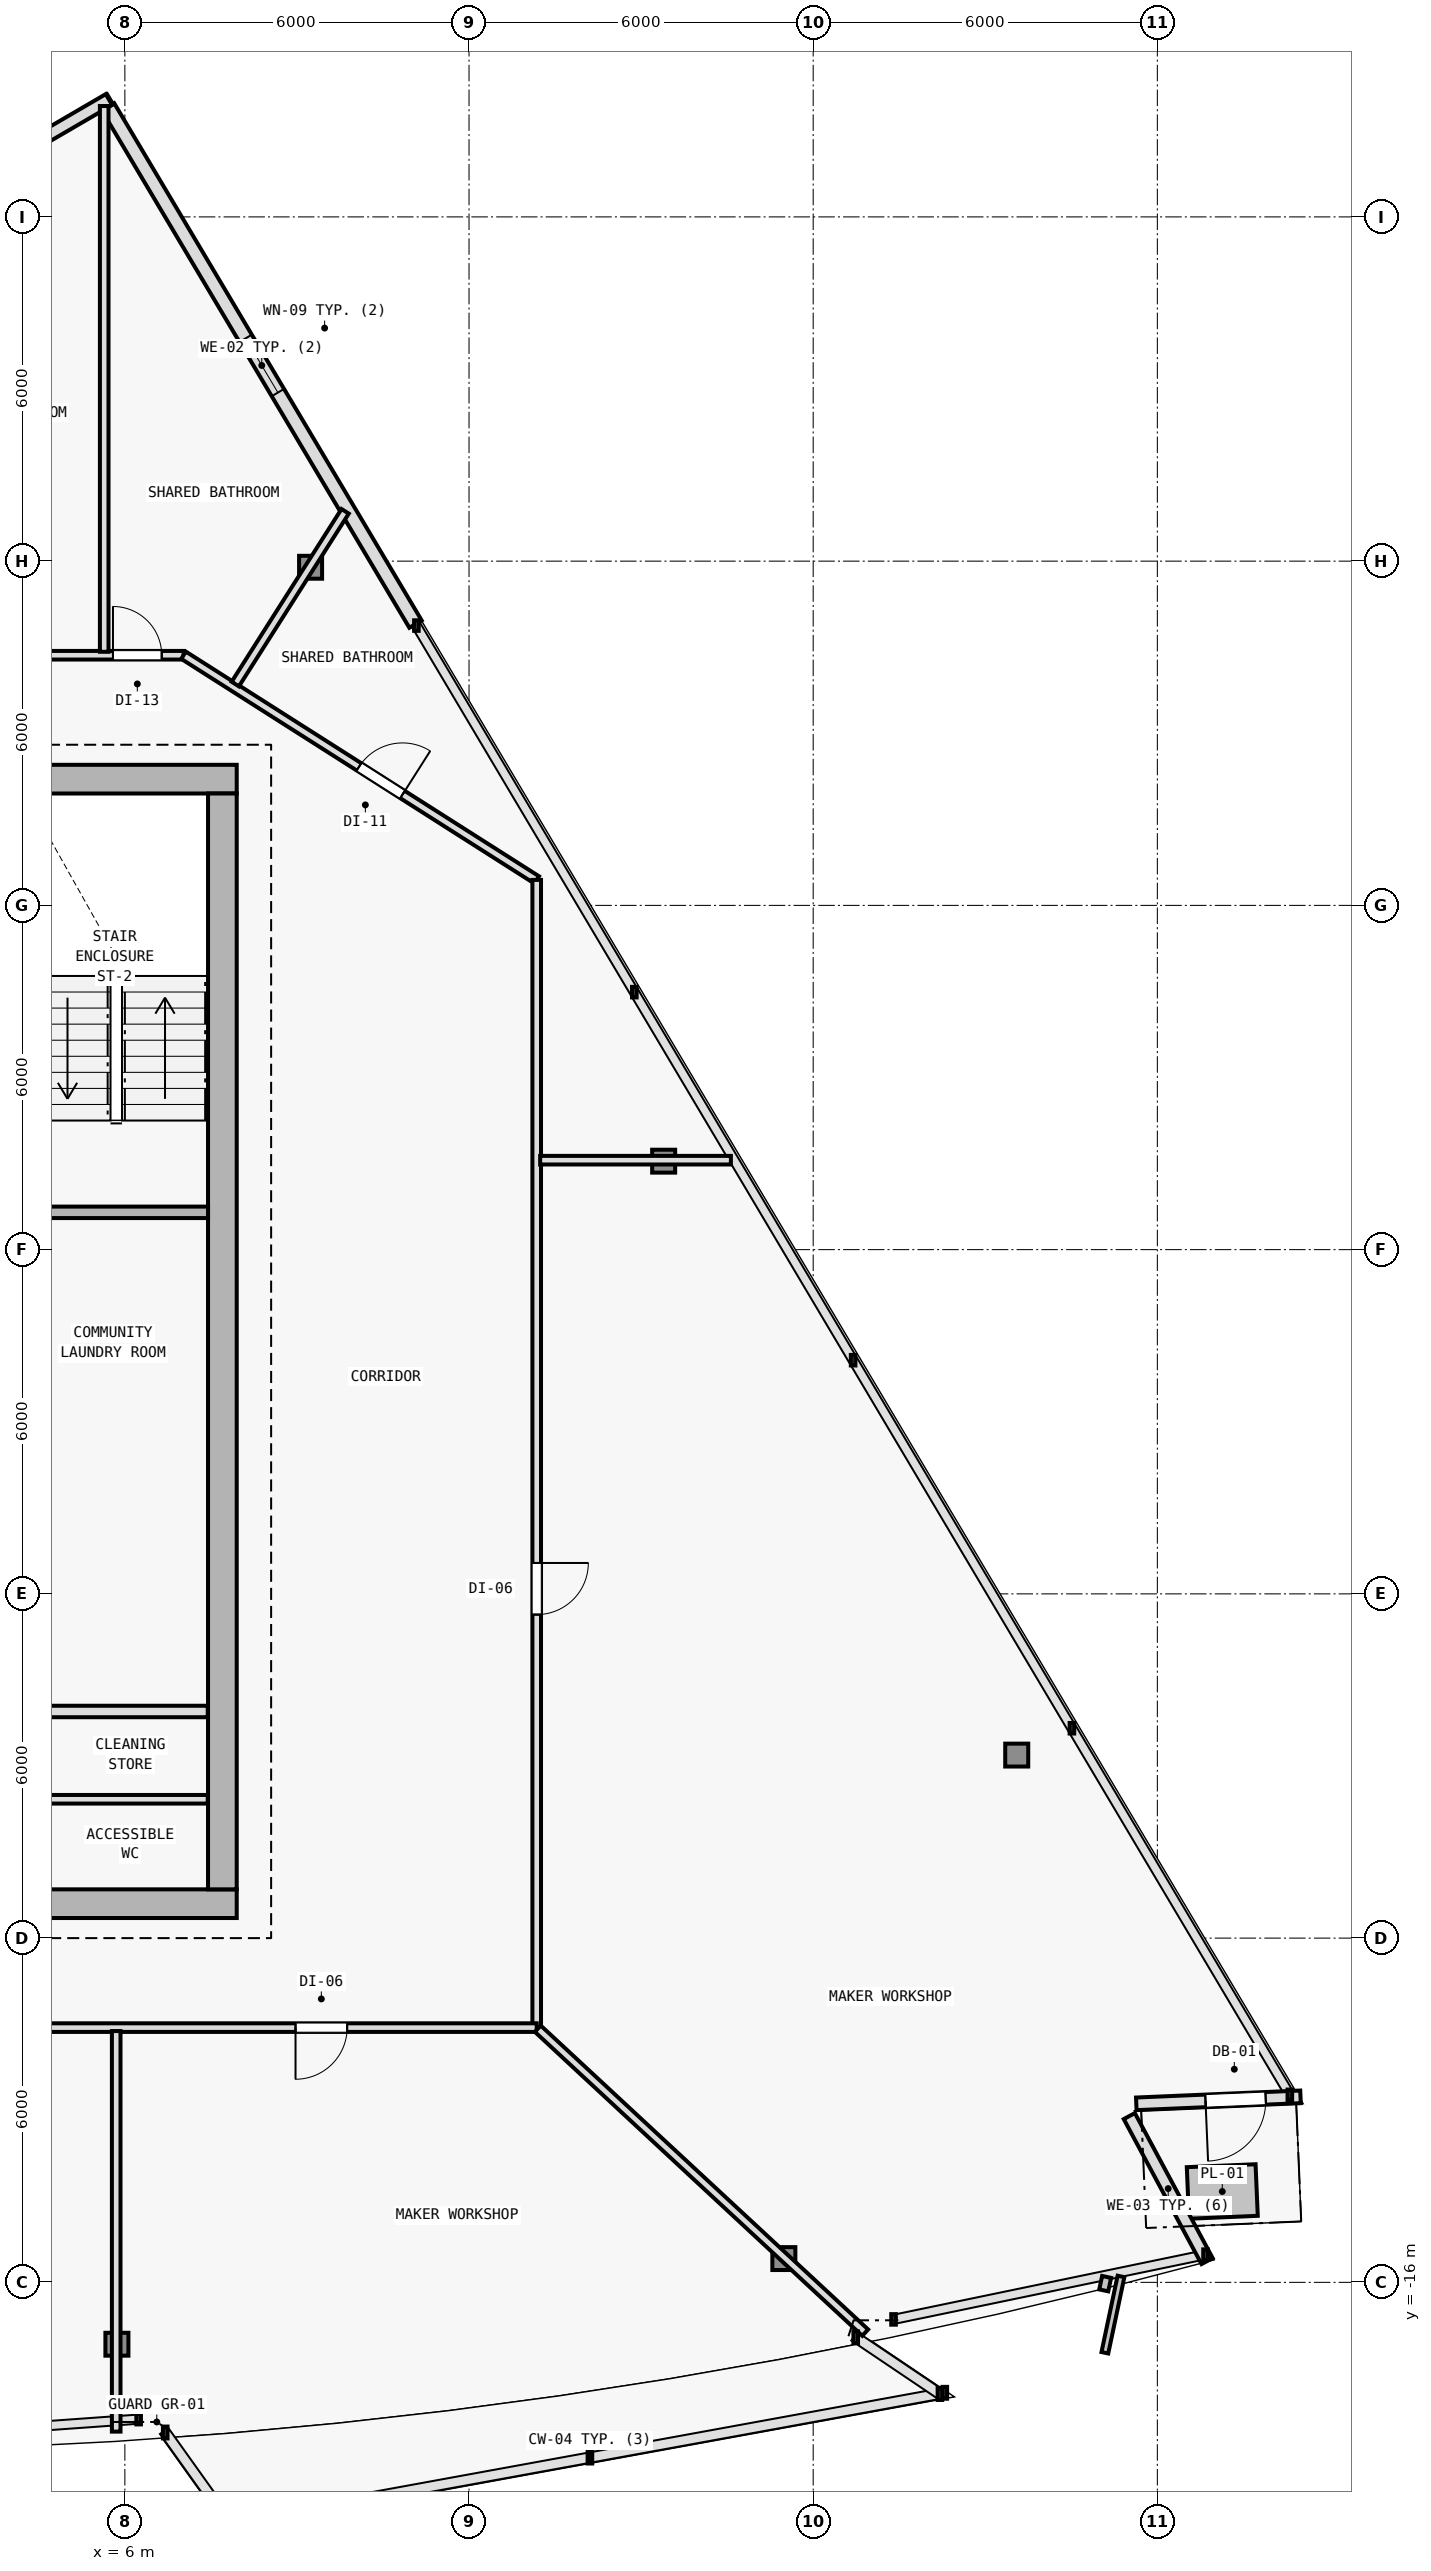
"""IFC4 building model, lengths in metres.
Left out: names, types, materials, properties, quantities, classifications, styles, units other than length and angle.
Written with IfcOpenShell. Run it as: python <this file> out.ifc"""

import sys

from ifc_helpers import new_model, si_unit, direction, frame, frame_2d, origin, origin_2d, place, context, subcontext, project, spatial, rectangle, i_section, extrude, element, fill, save


model = new_model("IFC4")
c1 = context("Model", 3, precision=1e-05, world=origin(), true_north=direction((0.0, 1.0)))
c2 = subcontext(c1, "Body", "Model", "MODEL_VIEW")
j1 = project(units=[si_unit("LENGTHUNIT", "METRE"), si_unit("PLANEANGLEUNIT", "RADIAN")], contexts=[c1])
p1 = place(None, origin())
s1 = spatial("IfcSite", under=j1, at=p1, CompositionType="ELEMENT")
p2 = place(p1, origin())
s2 = spatial("IfcBuilding", under=s1, at=p2, CompositionType="ELEMENT")
p3 = place(p2, frame((0.0, 0.0, 171.0)))
s3 = spatial("IfcBuildingStorey", under=s2, at=p3, CompositionType="ELEMENT", Elevation=171.0)
for number, where, z_axis, x_axis in (
    (1, (7.7, -9.4, 0.0), (0.0, 0.0, 1.0), (1.0, 0.0, 0.0)),
    (2, (7.7, 10.2, 0.0), (0.0, 0.0, 1.0), (1.0, 0.0, 0.0)),
    (3, (7.7, 0.4, 0.0), (0.0, 0.0, 1.0), (1.0, 0.0, 0.0)),
):
    element("IfcColumn", number, at=place(p3, frame(where, z_axis=z_axis, x_axis=x_axis)), inside=s3, PredefinedType="COLUMN", context=c2, shape_type="SweptSolid", body=[
        extrude(i_section(OverallWidth=0.404, OverallDepth=0.407, WebThickness=0.017, FlangeThickness=0.028, FilletRadius=0.015, at=origin_2d()), origin(), (0.0, 0.0, 1.0), 3.6),
    ])
p4 = place(p3, frame((5.861, -17.079, 0.006), z_axis=(-0.006934288159, 0.035283289748, 0.999353293441), x_axis=(-0.981229659911, -0.192842823335, 0.0)))
e4 = element("IfcColumn", 4, at=p4, inside=s3, PredefinedType="COLUMN", context=c2, shape_type="SweptSolid", body=[
    extrude(i_section(OverallWidth=0.401, OverallDepth=0.399, WebThickness=0.016, FlangeThickness=0.025, FilletRadius=0.015, at=origin_2d()), origin(), (0.0, 0.0, 1.0), 3.591),
])
p5 = place(p3, frame((17.489, -15.586, 0.006), z_axis=(-0.020596292833, 0.033511459955, 0.999226087917), x_axis=(-0.851954850327, -0.523615252838, 0.0)))
e5 = element("IfcColumn", 5, at=p5, inside=s3, PredefinedType="COLUMN", context=c2, shape_type="SweptSolid", body=[
    extrude(i_section(OverallWidth=0.401, OverallDepth=0.399, WebThickness=0.016, FlangeThickness=0.025, FilletRadius=0.015, at=origin_2d()), origin(), (0.0, 0.0, 1.0), 3.592),
])
p6 = place(p3, frame((21.548, -6.81, 0.006), z_axis=(-0.026107475214, 0.021552264695, 0.999426785525), x_axis=(-0.636621915226, -0.771176073964, 0.0)))
e6 = element("IfcColumn", 6, at=p6, inside=s3, PredefinedType="COLUMN", context=c2, shape_type="SweptSolid", body=[
    extrude(i_section(OverallWidth=0.401, OverallDepth=0.399, WebThickness=0.016, FlangeThickness=0.025, FilletRadius=0.015, at=origin_2d()), origin(), (0.0, 0.0, 1.0), 3.591),
])
p7 = place(p3, frame((15.393, 3.542, 0.006), z_axis=(-0.018907326549, 0.00952167524, 0.999775900241), x_axis=(-0.449781931574, -0.893138406984, 0.0)))
e7 = element("IfcColumn", 7, at=p7, inside=s3, PredefinedType="COLUMN", context=c2, shape_type="SweptSolid", body=[
    extrude(i_section(OverallWidth=0.401, OverallDepth=0.399, WebThickness=0.016, FlangeThickness=0.025, FilletRadius=0.015, at=origin_2d()), origin(), (0.0, 0.0, 1.0), 3.59),
])
p8 = place(p3, frame((9.238, 13.893, 0.006), z_axis=(-0.011699842352, -0.002516826552, 0.999928387072), x_axis=(0.210305364179, -0.977635746993, 0.0)))
e8 = element("IfcColumn", 8, at=p8, inside=s3, PredefinedType="COLUMN", context=c2, shape_type="SweptSolid", body=[
    extrude(i_section(OverallWidth=0.401, OverallDepth=0.399, WebThickness=0.016, FlangeThickness=0.025, FilletRadius=0.015, at=origin_2d()), origin(), (0.0, 0.0, 1.0), 3.589),
])
p9 = place(p3, frame((5.706, 21.919, 0.0), z_axis=(0.0, 0.0, 1.0), x_axis=(0.511079110892, -0.859533677298, 0.0)))
e9 = element("IfcWall", 9, at=p9, inside=s3, PredefinedType="SOLIDWALL", context=c2, shape_type="SweptSolid", body=[
    extrude(rectangle(XDim=10.489, YDim=0.25, at=frame_2d((5.245, 0.0))), origin(), (0.0, 0.0, 1.0), 3.35),
])
p10 = place(p9, frame((4.695, 0.0, 0.62)))
e10 = element("IfcOpeningElement", 10, at=p10, cuts=e9, PredefinedType="OPENING", context=c2, shape_type="SweptSolid", body=[
    extrude(rectangle(XDim=1.1, YDim=1.8, at=frame_2d((0.55, 0.9))), frame((0.0, 0.135, 0.0), z_axis=(0.0, -1.0, 0.0), x_axis=(1.0, 0.0, 0.0)), (0.0, 0.0, 1.0), 0.27),
])
p11 = place(p3, frame((23.511, -13.102, 0.0), z_axis=(0.0, 0.0, 1.0), x_axis=(0.472804807667, -0.881167188362, 0.0)))
e11 = element("IfcWall", 11, at=p11, inside=s3, PredefinedType="SOLIDWALL", context=c2, shape_type="SweptSolid", body=[
    extrude(rectangle(XDim=2.868, YDim=0.22, at=frame_2d((1.434, 0.0))), origin(), (0.0, 0.0, 1.0), 3.35),
])
p12 = place(p3, frame((26.496, -12.767, 0.0), z_axis=(0.0, 0.0, 1.0), x_axis=(-0.999095763679, -0.042516526188, 0.0)))
e12 = element("IfcWall", 12, at=p12, inside=s3, PredefinedType="SOLIDWALL", context=c2, shape_type="SweptSolid", body=[
    extrude(rectangle(XDim=2.865, YDim=0.22, at=frame_2d((1.433, 0.0))), origin(), (0.0, 0.0, 1.0), 3.35),
])
p13 = place(p12, frame((0.608, 0.0, 0.0)))
e13 = element("IfcOpeningElement", 13, at=p13, cuts=e12, PredefinedType="OPENING", context=c2, shape_type="SweptSolid", body=[
    extrude(rectangle(XDim=1.05, YDim=2.15, at=frame_2d((0.525, 1.075))), frame((0.0, 0.12, 0.0), z_axis=(0.0, -1.0, 0.0), x_axis=(1.0, 0.0, 0.0)), (0.0, 0.0, 1.0), 0.24),
])
p14 = place(p3, frame((1.987, 19.868, 0.0), z_axis=(0.0, 0.0, 1.0), x_axis=(0.863979520686, 0.503526948469, 0.0)))
e14 = element("IfcWall", 14, at=p14, inside=s3, PredefinedType="SOLIDWALL", context=c2, shape_type="SweptSolid", body=[
    extrude(rectangle(XDim=4.324, YDim=0.22, at=frame_2d((2.162, 0.0))), origin(), (0.0, 0.0, 1.0), 3.35),
])
p15 = place(p3, frame((-7.95, -9.4, 0.0), z_axis=(0.0, 0.0, 1.0), x_axis=(1.0, 0.0, 0.0)))
e15 = element("IfcWall", 15, at=p15, inside=s3, PredefinedType="SHEAR", context=c2, shape_type="SweptSolid", body=[
    extrude(rectangle(XDim=15.9, YDim=0.5, at=frame_2d((7.95, 0.0))), origin(), (0.0, 0.0, 1.0), 3.35),
])
p16 = place(p15, frame((9.6, 0.0, 0.0)))
e16 = element("IfcOpeningElement", 16, at=p16, cuts=e15, PredefinedType="OPENING", context=c2, shape_type="SweptSolid", body=[
    extrude(rectangle(XDim=1.5, YDim=2.2, at=frame_2d((0.75, 1.1))), frame((0.0, 0.26, 0.0), z_axis=(0.0, -1.0, 0.0), x_axis=(1.0, 0.0, 0.0)), (0.0, 0.0, 1.0), 0.52),
])
p17 = place(p3, frame((7.95, 10.2, 0.0), z_axis=(0.0, 0.0, 1.0), x_axis=(-1.0, 0.0, 0.0)))
e17 = element("IfcWall", 17, at=p17, inside=s3, PredefinedType="SHEAR", context=c2, shape_type="SweptSolid", body=[
    extrude(rectangle(XDim=15.9, YDim=0.5, at=frame_2d((7.95, 0.0))), origin(), (0.0, 0.0, 1.0), 3.35),
])
p18 = place(p17, frame((4.4, 0.0, 0.0)))
e18 = element("IfcOpeningElement", 18, at=p18, cuts=e17, PredefinedType="OPENING", context=c2, shape_type="SweptSolid", body=[
    extrude(rectangle(XDim=1.1, YDim=2.15, at=frame_2d((0.55, 1.075))), frame((0.0, 0.26, 0.0), z_axis=(0.0, -1.0, 0.0), x_axis=(1.0, 0.0, 0.0)), (0.0, 0.0, 1.0), 0.52),
])
p19 = place(p3, frame((7.7, 9.95, 0.0), z_axis=(0.0, 0.0, 1.0), x_axis=(0.0, -1.0, 0.0)))
e19 = element("IfcWall", 19, at=p19, inside=s3, PredefinedType="SHEAR", context=c2, shape_type="SweptSolid", body=[
    extrude(rectangle(XDim=19.1, YDim=0.5, at=frame_2d((9.55, 0.0))), origin(), (0.0, 0.0, 1.0), 3.35),
])
p20 = place(p3, frame((4.05, 2.65, 0.0), z_axis=(0.0, 0.0, 1.0), x_axis=(1.0, 0.0, 0.0)))
e20 = element("IfcWall", 20, at=p20, inside=s3, PredefinedType="SOLIDWALL", context=c2, shape_type="SweptSolid", body=[
    extrude(rectangle(XDim=3.4, YDim=0.2, at=frame_2d((1.7, 0.0))), origin(), (0.0, 0.0, 1.0), 3.35),
])
p21 = place(p3, frame((4.15, -6.05, 0.0), z_axis=(0.0, 0.0, 1.0), x_axis=(1.0, 0.0, 0.0)))
e21 = element("IfcWall", 21, at=p21, inside=s3, PredefinedType="SOLIDWALL", context=c2, shape_type="SweptSolid", body=[
    extrude(rectangle(XDim=3.295, YDim=0.2, at=frame_2d((1.647, 0.0))), origin(), (0.0, 0.0, 1.0), 3.35),
])
p22 = place(p3, frame((4.15, -7.58, 0.0), z_axis=(0.0, 0.0, 1.0), x_axis=(1.0, 0.0, 0.0)))
e22 = element("IfcWall", 22, at=p22, inside=s3, PredefinedType="PARTITIONING", context=c2, shape_type="SweptSolid", body=[
    extrude(rectangle(XDim=3.295, YDim=0.15, at=frame_2d((1.647, 0.0))), origin(), (0.0, 0.0, 1.0), 3.35),
])
p23 = place(p3, frame((-7.041, 12.36, 0.0), z_axis=(0.0, 0.0, 1.0), x_axis=(1.0, 0.0, 0.0)))
e23 = element("IfcWall", 23, at=p23, inside=s3, PredefinedType="PARTITIONING", context=c2, shape_type="SweptSolid", body=[
    extrude(rectangle(XDim=14.064, YDim=0.15, at=frame_2d((7.032, 0.0))), origin(), (0.0, 0.0, 1.0), 2.965),
])
p24 = place(p23, frame((12.833, 0.0, 0.0)))
e24 = element("IfcOpeningElement", 24, at=p24, cuts=e23, PredefinedType="OPENING", context=c2, shape_type="SweptSolid", body=[
    extrude(rectangle(XDim=0.85, YDim=2.1, at=frame_2d((0.425, 1.05))), frame((0.0, 0.085, 0.0), z_axis=(0.0, -1.0, 0.0), x_axis=(1.0, 0.0, 0.0)), (0.0, 0.0, 1.0), 0.17),
])
p25 = place(p23, frame((10.357, 0.0, 0.0)))
e25 = element("IfcOpeningElement", 25, at=p25, cuts=e23, PredefinedType="OPENING", context=c2, shape_type="SweptSolid", body=[
    extrude(rectangle(XDim=0.9, YDim=2.1, at=frame_2d((0.45, 1.05))), frame((0.0, 0.085, 0.0), z_axis=(0.0, -1.0, 0.0), x_axis=(1.0, 0.0, 0.0)), (0.0, 0.0, 1.0), 0.17),
])
p26 = place(p23, frame((4.167, 0.0, 0.0)))
e26 = element("IfcOpeningElement", 26, at=p26, cuts=e23, PredefinedType="OPENING", context=c2, shape_type="SweptSolid", body=[
    extrude(rectangle(XDim=0.9, YDim=2.1, at=frame_2d((0.45, 1.05))), frame((0.0, 0.085, 0.0), z_axis=(0.0, -1.0, 0.0), x_axis=(1.0, 0.0, 0.0)), (0.0, 0.0, 1.0), 0.17),
])
p27 = place(p3, frame((7.023, 12.36, 0.0), z_axis=(0.0, 0.0, 1.0), x_axis=(0.84376480085, -0.536713108511, 0.0)))
e27 = element("IfcWall", 27, at=p27, inside=s3, PredefinedType="PARTITIONING", context=c2, shape_type="SweptSolid", body=[
    extrude(rectangle(XDim=7.297, YDim=0.15, at=frame_2d((3.648, 0.0))), origin(), (0.0, 0.0, 1.0), 2.935),
])
p28 = place(p27, frame((3.624, 0.0, 0.0)))
e28 = element("IfcOpeningElement", 28, at=p28, cuts=e27, PredefinedType="OPENING", context=c2, shape_type="SweptSolid", body=[
    extrude(rectangle(XDim=0.9, YDim=2.1, at=frame_2d((0.45, 1.05))), frame((0.0, 0.085, 0.0), z_axis=(0.0, -1.0, 0.0), x_axis=(1.0, 0.0, 0.0)), (0.0, 0.0, 1.0), 0.17),
])
p29 = place(p3, frame((13.18, 8.444, 0.0), z_axis=(0.0, 0.0, 1.0), x_axis=(0.0, -1.0, 0.0)))
e29 = element("IfcWall", 29, at=p29, inside=s3, PredefinedType="PARTITIONING", context=c2, shape_type="SweptSolid", body=[
    extrude(rectangle(XDim=20.004, YDim=0.15, at=frame_2d((10.002, 0.0))), origin(), (0.0, 0.0, 1.0), 2.825),
])
p30 = place(p29, frame((11.905, 0.0, 0.0)))
e30 = element("IfcOpeningElement", 30, at=p30, cuts=e29, PredefinedType="OPENING", context=c2, shape_type="SweptSolid", body=[
    extrude(rectangle(XDim=0.9, YDim=2.1, at=frame_2d((0.45, 1.05))), frame((0.0, 0.085, 0.0), z_axis=(0.0, -1.0, 0.0), x_axis=(1.0, 0.0, 0.0)), (0.0, 0.0, 1.0), 0.17),
])
p31 = place(p3, frame((13.18, -11.56, 0.0), z_axis=(0.0, 0.0, 1.0), x_axis=(-1.0, 0.0, 0.0)))
e31 = element("IfcWall", 31, at=p31, inside=s3, PredefinedType="PARTITIONING", context=c2, shape_type="SweptSolid", body=[
    extrude(rectangle(XDim=23.04, YDim=0.15, at=frame_2d((11.52, 0.0))), origin(), (0.0, 0.0, 1.0), 2.825),
])
p32 = place(p31, frame((19.585, 0.0, 0.0)))
e32 = element("IfcOpeningElement", 32, at=p32, cuts=e31, PredefinedType="OPENING", context=c2, shape_type="SweptSolid", body=[
    extrude(rectangle(XDim=0.9, YDim=2.1, at=frame_2d((0.45, 1.05))), frame((0.0, 0.085, 0.0), z_axis=(0.0, -1.0, 0.0), x_axis=(1.0, 0.0, 0.0)), (0.0, 0.0, 1.0), 0.17),
])
p33 = place(p31, frame((14.29, 0.0, 0.0)))
e33 = element("IfcOpeningElement", 33, at=p33, cuts=e31, PredefinedType="OPENING", context=c2, shape_type="SweptSolid", body=[
    extrude(rectangle(XDim=0.9, YDim=2.1, at=frame_2d((0.45, 1.05))), frame((0.0, 0.085, 0.0), z_axis=(0.0, -1.0, 0.0), x_axis=(1.0, 0.0, 0.0)), (0.0, 0.0, 1.0), 0.17),
])
p34 = place(p31, frame((9.351, 0.0, 0.0)))
e34 = element("IfcOpeningElement", 34, at=p34, cuts=e31, PredefinedType="OPENING", context=c2, shape_type="SweptSolid", body=[
    extrude(rectangle(XDim=0.9, YDim=2.1, at=frame_2d((0.45, 1.05))), frame((0.0, 0.085, 0.0), z_axis=(0.0, -1.0, 0.0), x_axis=(1.0, 0.0, 0.0)), (0.0, 0.0, 1.0), 0.17),
])
p35 = place(p31, frame((3.305, 0.0, 0.0)))
e35 = element("IfcOpeningElement", 35, at=p35, cuts=e31, PredefinedType="OPENING", context=c2, shape_type="SweptSolid", body=[
    extrude(rectangle(XDim=0.9, YDim=2.1, at=frame_2d((0.45, 1.05))), frame((0.0, 0.085, 0.0), z_axis=(0.0, -1.0, 0.0), x_axis=(1.0, 0.0, 0.0)), (0.0, 0.0, 1.0), 0.17),
])
p36 = place(p3, frame((5.849, -11.62, 0.0), z_axis=(0.0, 0.0, 1.0), x_axis=(0.0, -1.0, 0.0)))
e36 = element("IfcWall", 36, at=p36, inside=s3, PredefinedType="PARTITIONING", context=c2, shape_type="SweptSolid", body=[
    extrude(rectangle(XDim=6.981, YDim=0.15, at=frame_2d((3.491, 0.0))), origin(), (0.0, 0.0, 1.0), 2.775),
])
p37 = place(p3, frame((13.199, -11.579, 0.0), z_axis=(0.0, 0.0, 1.0), x_axis=(0.732995559775, -0.680233422694, 0.0)))
e37 = element("IfcWall", 37, at=p37, inside=s3, PredefinedType="PARTITIONING", context=c2, shape_type="SweptSolid", body=[
    extrude(rectangle(XDim=7.788, YDim=0.15, at=frame_2d((3.894, 0.0))), origin(), (0.0, 0.0, 1.0), 2.775),
])
p38 = place(p3, frame((13.24, 3.559, 0.0), z_axis=(0.0, 0.0, 1.0), x_axis=(1.0, 0.0, 0.0)))
e38 = element("IfcWall", 38, at=p38, inside=s3, PredefinedType="PARTITIONING", context=c2, shape_type="SweptSolid", body=[
    extrude(rectangle(XDim=3.325, YDim=0.15, at=frame_2d((1.663, 0.0))), origin(), (0.0, 0.0, 1.0), 2.935),
])
p39 = place(p3, frame((7.925, 11.858, 0.0), z_axis=(0.0, 0.0, 1.0), x_axis=(0.536716115778, 0.84376288794, 0.0)))
e39 = element("IfcWall", 39, at=p39, inside=s3, PredefinedType="PARTITIONING", context=c2, shape_type="SweptSolid", body=[
    extrude(rectangle(XDim=3.569, YDim=0.15, at=frame_2d((1.784, 0.0))), origin(), (0.0, 0.0, 1.0), 2.935),
])
p40 = place(p3, frame((5.64, 12.42, 0.0), z_axis=(0.0, 0.0, 1.0), x_axis=(0.0, 1.0, 0.0)))
e40 = element("IfcWall", 40, at=p40, inside=s3, PredefinedType="PARTITIONING", context=c2, shape_type="SweptSolid", body=[
    extrude(rectangle(XDim=9.513, YDim=0.15, at=frame_2d((4.756, 0.0))), origin(), (0.0, 0.0, 1.0), 2.935),
])
p41 = place(p10, origin())
e41 = element("IfcWindow", 41, at=p41, inside=s3, PartitioningType="SINGLE_PANEL", PredefinedType="WINDOW", context=c2, shape_type="SweptSolid", body=[
    extrude(rectangle(XDim=1.1, YDim=1.8, at=frame_2d((0.55, 0.9))), frame((0.0, 0.03, 0.0), z_axis=(0.0, -1.0, 0.0), x_axis=(1.0, 0.0, 0.0)), (0.0, 0.0, 1.0), 0.06),
])
fill(e10, e41)
p42 = place(p13, origin())
e42 = element("IfcDoor", 42, at=p42, inside=s3, OperationType="SINGLE_SWING_RIGHT", PredefinedType="DOOR", context=c2, shape_type="SweptSolid", body=[
    extrude(rectangle(XDim=1.05, YDim=2.15, at=frame_2d((0.525, 1.075))), frame((0.0, 0.025, 0.0), z_axis=(0.0, -1.0, 0.0), x_axis=(1.0, 0.0, 0.0)), (0.0, 0.0, 1.0), 0.05),
])
fill(e13, e42)
p43 = place(p35, origin())
e43 = element("IfcDoor", 43, at=p43, inside=s3, OperationType="SINGLE_SWING_RIGHT", PredefinedType="DOOR", context=c2, shape_type="SweptSolid", body=[
    extrude(rectangle(XDim=0.9, YDim=2.1, at=frame_2d((0.45, 1.05))), frame((0.0, 0.025, 0.0), z_axis=(0.0, -1.0, 0.0), x_axis=(1.0, 0.0, 0.0)), (0.0, 0.0, 1.0), 0.05),
])
fill(e35, e43)
p44 = place(p30, origin())
e44 = element("IfcDoor", 44, at=p44, inside=s3, OperationType="SINGLE_SWING_LEFT", PredefinedType="DOOR", context=c2, shape_type="SweptSolid", body=[
    extrude(rectangle(XDim=0.9, YDim=2.1, at=frame_2d((0.45, 1.05))), frame((0.0, 0.025, 0.0), z_axis=(0.0, -1.0, 0.0), x_axis=(1.0, 0.0, 0.0)), (0.0, 0.0, 1.0), 0.05),
])
fill(e30, e44)
p45 = place(p28, origin())
e45 = element("IfcDoor", 45, at=p45, inside=s3, OperationType="SINGLE_SWING_RIGHT", PredefinedType="DOOR", context=c2, shape_type="SweptSolid", body=[
    extrude(rectangle(XDim=0.9, YDim=2.1, at=frame_2d((0.45, 1.05))), frame((0.0, 0.025, 0.0), z_axis=(0.0, -1.0, 0.0), x_axis=(1.0, 0.0, 0.0)), (0.0, 0.0, 1.0), 0.05),
])
fill(e28, e45)
p46 = place(p24, origin())
e46 = element("IfcDoor", 46, at=p46, inside=s3, OperationType="SINGLE_SWING_LEFT", PredefinedType="DOOR", context=c2, shape_type="SweptSolid", body=[
    extrude(rectangle(XDim=0.85, YDim=2.1, at=frame_2d((0.425, 1.05))), frame((0.0, 0.025, 0.0), z_axis=(0.0, -1.0, 0.0), x_axis=(1.0, 0.0, 0.0)), (0.0, 0.0, 1.0), 0.05),
])
fill(e24, e46)
save(model, sys.argv[1])
